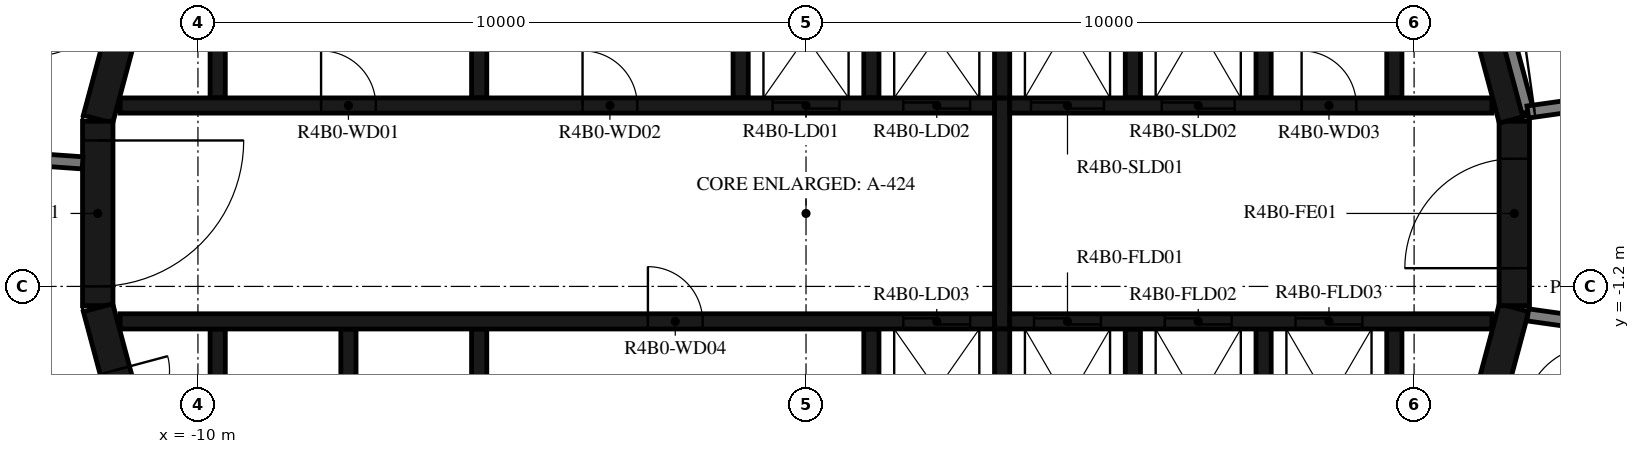
"""IFC4 building model, lengths in metres.
Left out: names, types, materials, properties, quantities, classifications, styles, units other than length and angle.
Written with IfcOpenShell. Run it as: python <this file> out.ifc"""

import sys

from ifc_helpers import new_model, si_unit, direction, frame, frame_2d, origin, place, context, subcontext, project, spatial, polyline, rectangle, outline, extrude, element, fill, save


model = new_model("IFC4")
c1 = context("Model", 3, precision=1e-05, world=origin(), true_north=direction((0.0, 1.0)))
c2 = subcontext(c1, "Body", "Model", "MODEL_VIEW")
j1 = project(units=[si_unit("LENGTHUNIT", "METRE"), si_unit("PLANEANGLEUNIT", "RADIAN")], contexts=[c1])
p1 = place(None, origin())
s1 = spatial("IfcSite", under=j1, at=p1, CompositionType="ELEMENT")
p2 = place(p1, origin())
s2 = spatial("IfcBuilding", under=s1, at=p2, CompositionType="ELEMENT")
p3 = place(p2, frame((0.0, 0.0, 165.7)))
s3 = spatial("IfcBuildingStorey", under=s2, at=p3, CompositionType="ELEMENT", Elevation=165.7)
p4 = place(p3, frame((10.858, -4.479, 0.0), z_axis=(0.0, 0.0, 1.0), x_axis=(0.258734743916, 0.965948410781, 0.0)))
e1 = element("IfcWall", 1, at=p4, inside=s3, PredefinedType="SHEAR", context=c2, shape_type="SweptSolid", body=[
    extrude(rectangle(XDim=3.033, YDim=0.5, at=frame_2d((1.516, 0.0))), origin(), (0.0, 0.0, 1.0), 3.12),
])
p5 = place(p3, frame((11.647, -1.516, 0.0), z_axis=(0.0, 0.0, 1.0), x_axis=(0.0, 1.0, 0.0)))
e2 = element("IfcWall", 2, at=p5, inside=s3, PredefinedType="SHEAR", context=c2, shape_type="SweptSolid", body=[
    extrude(rectangle(XDim=3.033, YDim=0.5, at=frame_2d((1.516, 0.0))), origin(), (0.0, 0.0, 1.0), 3.12),
])
p6 = place(p5, frame((0.616, 0.0, 0.0)))
e3 = element("IfcOpeningElement", 3, at=p6, cuts=e2, PredefinedType="OPENING", context=c2, shape_type="SweptSolid", body=[
    extrude(rectangle(XDim=1.8, YDim=2.1, at=frame_2d((0.9, 1.05))), frame((0.0, 0.26, 0.0), z_axis=(0.0, -1.0, 0.0), x_axis=(1.0, 0.0, 0.0)), (0.0, 0.0, 1.0), 0.52),
])
for number, where, z_axis, x_axis in (
    (4, (11.643, 1.55, 0.0), (0.0, 0.0, 1.0), (-0.259, 0.966, 0.0)),
    (5, (-10.858, 4.479, 0.0), (0.0, 0.0, 1.0), (-0.259, -0.966, 0.0)),
):
    element("IfcWall", number, at=place(p3, frame(where, z_axis=z_axis, x_axis=x_axis)), inside=s3, PredefinedType="SHEAR", context=c2, shape_type="SweptSolid", body=[
        extrude(rectangle(XDim=3.033, YDim=0.5, at=frame_2d((1.516, 0.0))), origin(), (0.0, 0.0, 1.0), 3.12),
    ])
p7 = place(p3, frame((-11.647, 1.516, 0.0), z_axis=(0.0, 0.0, 1.0), x_axis=(0.0, -1.0, 0.0)))
e6 = element("IfcWall", 6, at=p7, inside=s3, PredefinedType="SHEAR", context=c2, shape_type="SweptSolid", body=[
    extrude(rectangle(XDim=3.033, YDim=0.5, at=frame_2d((1.516, 0.0))), origin(), (0.0, 0.0, 1.0), 3.12),
])
p8 = place(p7, frame((0.316, 0.0, 0.0)))
e7 = element("IfcOpeningElement", 7, at=p8, cuts=e6, PredefinedType="OPENING", context=c2, shape_type="SweptSolid", body=[
    extrude(rectangle(XDim=2.4, YDim=2.1, at=frame_2d((1.2, 1.05))), frame((0.0, 0.26, 0.0), z_axis=(0.0, -1.0, 0.0), x_axis=(1.0, 0.0, 0.0)), (0.0, 0.0, 1.0), 0.52),
])
p9 = place(p3, frame((-11.643, -1.55, 0.0), z_axis=(0.0, 0.0, 1.0), x_axis=(0.258734743916, -0.965948410781, 0.0)))
e8 = element("IfcWall", 8, at=p9, inside=s3, PredefinedType="SHEAR", context=c2, shape_type="SweptSolid", body=[
    extrude(rectangle(XDim=3.033, YDim=0.5, at=frame_2d((1.516, 0.0))), origin(), (0.0, 0.0, 1.0), 3.12),
])
p10 = place(p9, frame((1.066, 0.0, 0.0)))
e9 = element("IfcOpeningElement", 9, at=p10, cuts=e8, PredefinedType="OPENING", context=c2, shape_type="SweptSolid", body=[
    extrude(rectangle(XDim=0.9, YDim=2.1, at=frame_2d((0.45, 1.05))), frame((0.0, 0.26, 0.0), z_axis=(0.0, -1.0, 0.0), x_axis=(1.0, 0.0, 0.0)), (0.0, 0.0, 1.0), 0.52),
])
p11 = place(p3, origin())
e10 = element("IfcWall", 10, at=p11, inside=s3, PredefinedType="SHEAR", context=c2, shape_type="SweptSolid", body=[
    extrude(outline(polyline([(-9.55, 4.8), (-5.5, 4.8), (-5.5, 1.9), (-5.25, 1.9), (-5.25, 4.8), (-1.2, 4.8), (-1.2, 1.9), (-0.95, 1.9), (-0.95, 4.8), (0.95, 4.8), (0.95, 1.9), (1.2, 1.9), (1.2, 4.8), (3.1, 4.8), (3.1, 1.9), (3.35, 1.9), (3.35, 4.8), (5.25, 4.8), (5.25, 1.9), (5.5, 1.9), (5.5, 4.8), (7.4, 4.8), (7.4, 1.9), (7.65, 1.9), (7.65, 4.8), (9.55, 4.8), (9.55, 1.9), (9.8, 1.9), (9.8, 4.8), (9.8, 5.05), (-9.8, 5.05), (-9.8, 4.8), (-9.8, 1.9), (-9.55, 1.9), (-9.55, 4.8)])), origin(), (0.0, 0.0, 1.0), 3.12),
])
p12 = place(p3, origin())
e11 = element("IfcWall", 11, at=p12, inside=s3, PredefinedType="SHEAR", context=c2, shape_type="SweptSolid", body=[
    extrude(outline(polyline([(9.8, -5.05), (9.8, -4.8), (9.8, -1.9), (9.55, -1.9), (9.55, -4.8), (7.65, -4.8), (7.65, -1.9), (7.4, -1.9), (7.4, -4.8), (5.5, -4.8), (5.5, -1.9), (5.25, -1.9), (5.25, -4.8), (3.35, -4.8), (3.35, -1.9), (3.1, -1.9), (3.1, -4.8), (1.2, -4.8), (1.2, -1.9), (0.95, -1.9), (0.95, -4.8), (-5.25, -4.8), (-5.25, -1.9), (-5.5, -1.9), (-5.5, -4.8), (-7.4, -4.8), (-7.4, -1.9), (-7.65, -1.9), (-7.65, -4.8), (-9.55, -4.8), (-9.55, -1.9), (-9.8, -1.9), (-9.8, -4.8), (-9.8, -5.05), (9.8, -5.05)])), origin(), (0.0, 0.0, 1.0), 3.12),
])
p13 = place(p3, frame((-11.28, 1.775, 0.0), z_axis=(0.0, 0.0, 1.0), x_axis=(1.0, 0.0, 0.0)))
e12 = element("IfcWall", 12, at=p13, inside=s3, PredefinedType="SHEAR", context=c2, shape_type="SweptSolid", body=[
    extrude(rectangle(XDim=14.38, YDim=0.25, at=frame_2d((7.19, 0.0))), origin(), (0.0, 0.0, 1.0), 3.12),
])
p14 = place(p13, frame((10.73, 0.0, 0.0)))
e13 = element("IfcOpeningElement", 13, at=p14, cuts=e12, PredefinedType="OPENING", context=c2, shape_type="SweptSolid", body=[
    extrude(rectangle(XDim=1.1, YDim=2.1, at=frame_2d((0.55, 1.05))), frame((0.0, 0.135, 0.0), z_axis=(0.0, -1.0, 0.0), x_axis=(1.0, 0.0, 0.0)), (0.0, 0.0, 1.0), 0.27),
])
p15 = place(p13, frame((12.88, 0.0, 0.0)))
e14 = element("IfcOpeningElement", 14, at=p15, cuts=e12, PredefinedType="OPENING", context=c2, shape_type="SweptSolid", body=[
    extrude(rectangle(XDim=1.1, YDim=2.1, at=frame_2d((0.55, 1.05))), frame((0.0, 0.135, 0.0), z_axis=(0.0, -1.0, 0.0), x_axis=(1.0, 0.0, 0.0)), (0.0, 0.0, 1.0), 0.27),
])
p16 = place(p13, frame((3.305, 0.0, 0.0)))
e15 = element("IfcOpeningElement", 15, at=p16, cuts=e12, PredefinedType="OPENING", context=c2, shape_type="SweptSolid", body=[
    extrude(rectangle(XDim=0.9, YDim=2.1, at=frame_2d((0.45, 1.05))), frame((0.0, 0.135, 0.0), z_axis=(0.0, -1.0, 0.0), x_axis=(1.0, 0.0, 0.0)), (0.0, 0.0, 1.0), 0.27),
])
p17 = place(p13, frame((7.605, 0.0, 0.0)))
e16 = element("IfcOpeningElement", 16, at=p17, cuts=e12, PredefinedType="OPENING", context=c2, shape_type="SweptSolid", body=[
    extrude(rectangle(XDim=0.9, YDim=2.1, at=frame_2d((0.45, 1.05))), frame((0.0, 0.135, 0.0), z_axis=(0.0, -1.0, 0.0), x_axis=(1.0, 0.0, 0.0)), (0.0, 0.0, 1.0), 0.27),
])
p18 = place(p3, frame((3.35, 1.775, 0.0), z_axis=(0.0, 0.0, 1.0), x_axis=(1.0, 0.0, 0.0)))
e17 = element("IfcWall", 17, at=p18, inside=s3, PredefinedType="SHEAR", context=c2, shape_type="SweptSolid", body=[
    extrude(rectangle(XDim=7.93, YDim=0.25, at=frame_2d((3.965, 0.0))), origin(), (0.0, 0.0, 1.0), 3.12),
])
p19 = place(p18, frame((0.35, 0.0, 0.0)))
e18 = element("IfcOpeningElement", 18, at=p19, cuts=e17, PredefinedType="OPENING", context=c2, shape_type="SweptSolid", body=[
    extrude(rectangle(XDim=1.2, YDim=2.4, at=frame_2d((0.6, 1.2))), frame((0.0, 0.135, 0.0), z_axis=(0.0, -1.0, 0.0), x_axis=(1.0, 0.0, 0.0)), (0.0, 0.0, 1.0), 0.27),
])
p20 = place(p18, frame((2.5, 0.0, 0.0)))
e19 = element("IfcOpeningElement", 19, at=p20, cuts=e17, PredefinedType="OPENING", context=c2, shape_type="SweptSolid", body=[
    extrude(rectangle(XDim=1.2, YDim=2.4, at=frame_2d((0.6, 1.2))), frame((0.0, 0.135, 0.0), z_axis=(0.0, -1.0, 0.0), x_axis=(1.0, 0.0, 0.0)), (0.0, 0.0, 1.0), 0.27),
])
p21 = place(p18, frame((4.8, 0.0, 0.0)))
e20 = element("IfcOpeningElement", 20, at=p21, cuts=e17, PredefinedType="OPENING", context=c2, shape_type="SweptSolid", body=[
    extrude(rectangle(XDim=0.9, YDim=2.1, at=frame_2d((0.45, 1.05))), frame((0.0, 0.135, 0.0), z_axis=(0.0, -1.0, 0.0), x_axis=(1.0, 0.0, 0.0)), (0.0, 0.0, 1.0), 0.27),
])
p22 = place(p3, frame((-11.28, -1.775, 0.0), z_axis=(0.0, 0.0, 1.0), x_axis=(1.0, 0.0, 0.0)))
e21 = element("IfcWall", 21, at=p22, inside=s3, PredefinedType="SHEAR", context=c2, shape_type="SweptSolid", body=[
    extrude(rectangle(XDim=14.38, YDim=0.25, at=frame_2d((7.19, 0.0))), origin(), (0.0, 0.0, 1.0), 3.12),
])
p23 = place(p22, frame((12.88, 0.0, 0.0)))
e22 = element("IfcOpeningElement", 22, at=p23, cuts=e21, PredefinedType="OPENING", context=c2, shape_type="SweptSolid", body=[
    extrude(rectangle(XDim=1.1, YDim=2.1, at=frame_2d((0.55, 1.05))), frame((0.0, 0.135, 0.0), z_axis=(0.0, -1.0, 0.0), x_axis=(1.0, 0.0, 0.0)), (0.0, 0.0, 1.0), 0.27),
])
p24 = place(p22, frame((8.68, 0.0, 0.0)))
e23 = element("IfcOpeningElement", 23, at=p24, cuts=e21, PredefinedType="OPENING", context=c2, shape_type="SweptSolid", body=[
    extrude(rectangle(XDim=0.9, YDim=2.1, at=frame_2d((0.45, 1.05))), frame((0.0, 0.135, 0.0), z_axis=(0.0, -1.0, 0.0), x_axis=(1.0, 0.0, 0.0)), (0.0, 0.0, 1.0), 0.27),
])
p25 = place(p3, frame((3.35, -1.775, 0.0), z_axis=(0.0, 0.0, 1.0), x_axis=(1.0, 0.0, 0.0)))
e24 = element("IfcWall", 24, at=p25, inside=s3, PredefinedType="SHEAR", context=c2, shape_type="SweptSolid", body=[
    extrude(rectangle(XDim=7.93, YDim=0.25, at=frame_2d((3.965, 0.0))), origin(), (0.0, 0.0, 1.0), 3.12),
])
p26 = place(p25, frame((0.4, 0.0, 0.0)))
e25 = element("IfcOpeningElement", 25, at=p26, cuts=e24, PredefinedType="OPENING", context=c2, shape_type="SweptSolid", body=[
    extrude(rectangle(XDim=1.1, YDim=2.4, at=frame_2d((0.55, 1.2))), frame((0.0, 0.135, 0.0), z_axis=(0.0, -1.0, 0.0), x_axis=(1.0, 0.0, 0.0)), (0.0, 0.0, 1.0), 0.27),
])
p27 = place(p25, frame((2.55, 0.0, 0.0)))
e26 = element("IfcOpeningElement", 26, at=p27, cuts=e24, PredefinedType="OPENING", context=c2, shape_type="SweptSolid", body=[
    extrude(rectangle(XDim=1.1, YDim=2.4, at=frame_2d((0.55, 1.2))), frame((0.0, 0.135, 0.0), z_axis=(0.0, -1.0, 0.0), x_axis=(1.0, 0.0, 0.0)), (0.0, 0.0, 1.0), 0.27),
])
p28 = place(p25, frame((4.7, 0.0, 0.0)))
e27 = element("IfcOpeningElement", 27, at=p28, cuts=e24, PredefinedType="OPENING", context=c2, shape_type="SweptSolid", body=[
    extrude(rectangle(XDim=1.1, YDim=2.4, at=frame_2d((0.55, 1.2))), frame((0.0, 0.135, 0.0), z_axis=(0.0, -1.0, 0.0), x_axis=(1.0, 0.0, 0.0)), (0.0, 0.0, 1.0), 0.27),
])
p29 = place(p3, frame((3.225, -1.9, 0.0), z_axis=(0.0, 0.0, 1.0), x_axis=(0.0, 1.0, 0.0)))
e28 = element("IfcWall", 28, at=p29, inside=s3, PredefinedType="SHEAR", context=c2, shape_type="SweptSolid", body=[
    extrude(rectangle(XDim=3.8, YDim=0.25, at=frame_2d((1.9, 0.0))), origin(), (0.0, 0.0, 1.0), 3.12),
])
p30 = place(p3, frame((11.87, 1.668, 0.0), z_axis=(0.0, 0.0, 1.0), x_axis=(-0.258836880648, 0.965921047093, 0.0)))
e29 = element("IfcWall", 29, at=p30, inside=s3, PredefinedType="STANDARD", context=c2, shape_type="SweptSolid", body=[
    extrude(rectangle(XDim=1.695, YDim=0.2, at=frame_2d((0.848, 0.0))), origin(), (0.0, 0.0, 1.0), 3.12),
])
p31 = place(p3, frame((11.87, 1.668, 0.0), z_axis=(0.0, 0.0, 1.0), x_axis=(0.990270910415, 0.139152879904, 0.0)))
e30 = element("IfcWall", 30, at=p31, inside=s3, PredefinedType="STANDARD", context=c2, shape_type="SweptSolid", body=[
    extrude(rectangle(XDim=1.688, YDim=0.2, at=frame_2d((0.844, 0.0))), origin(), (0.0, 0.0, 1.0), 3.12),
])
p32 = place(p31, frame((0.11, 0.0, 0.0)))
e31 = element("IfcOpeningElement", 31, at=p32, cuts=e30, PredefinedType="OPENING", context=c2, shape_type="SweptSolid", body=[
    extrude(rectangle(XDim=1.2, YDim=2.1, at=frame_2d((0.6, 1.05))), frame((0.0, 0.11, 0.0), z_axis=(0.0, -1.0, 0.0), x_axis=(1.0, 0.0, 0.0)), (0.0, 0.0, 1.0), 0.22),
])
p33 = place(p3, frame((13.542, 1.903, 0.0), z_axis=(0.0, 0.0, 1.0), x_axis=(-0.333808508206, 0.942640907159, 0.0)))
e32 = element("IfcWall", 32, at=p33, inside=s3, PredefinedType="STANDARD", context=c2, shape_type="SweptSolid", body=[
    extrude(rectangle(XDim=6.317, YDim=0.2, at=frame_2d((3.158, 0.0))), origin(), (0.0, 0.0, 1.0), 3.12),
])
p34 = place(p3, frame((-13.454, 0.941, 0.0), z_axis=(0.0, 0.0, 1.0), x_axis=(0.99755155062, -0.069934997354, 0.0)))
e33 = element("IfcWall", 33, at=p34, inside=s3, PredefinedType="STANDARD", context=c2, shape_type="SweptSolid", body=[
    extrude(rectangle(XDim=1.561, YDim=0.2, at=frame_2d((0.78, 0.0))), origin(), (0.0, 0.0, 1.0), 3.12),
])
p35 = place(p3, frame((13.282, -1.867, 0.0), z_axis=(0.0, 0.0, 1.0), x_axis=(-0.990265430288, 0.139191873241, 0.0)))
e34 = element("IfcWall", 34, at=p35, inside=s3, PredefinedType="STANDARD", context=c2, shape_type="SweptSolid", body=[
    extrude(rectangle(XDim=1.426, YDim=0.2, at=frame_2d((0.713, 0.0))), origin(), (0.0, 0.0, 1.0), 3.12),
])
p36 = place(p8, origin())
e35 = element("IfcDoor", 35, at=p36, inside=s3, OperationType="DOUBLE_DOOR_SINGLE_SWING", PredefinedType="DOOR", context=c2, shape_type="SweptSolid", body=[
    extrude(rectangle(XDim=2.4, YDim=2.1, at=frame_2d((1.2, 1.05))), frame((0.0, 0.025, 0.0), z_axis=(0.0, -1.0, 0.0), x_axis=(1.0, 0.0, 0.0)), (0.0, 0.0, 1.0), 0.05),
])
fill(e7, e35)
p37 = place(p6, origin())
e36 = element("IfcDoor", 36, at=p37, inside=s3, OperationType="DOUBLE_DOOR_SINGLE_SWING", PredefinedType="DOOR", context=c2, shape_type="SweptSolid", body=[
    extrude(rectangle(XDim=1.8, YDim=2.1, at=frame_2d((0.9, 1.05))), frame((0.0, 0.025, 0.0), z_axis=(0.0, -1.0, 0.0), x_axis=(1.0, 0.0, 0.0)), (0.0, 0.0, 1.0), 0.05),
])
fill(e3, e36)
p38 = place(p14, origin())
e37 = element("IfcDoor", 37, at=p38, inside=s3, OperationType="DOUBLE_DOOR_SLIDING", PredefinedType="DOOR", context=c2, shape_type="SweptSolid", body=[
    extrude(rectangle(XDim=1.1, YDim=2.1, at=frame_2d((0.55, 1.05))), frame((0.0, 0.025, 0.0), z_axis=(0.0, -1.0, 0.0), x_axis=(1.0, 0.0, 0.0)), (0.0, 0.0, 1.0), 0.05),
])
fill(e13, e37)
p39 = place(p15, origin())
e38 = element("IfcDoor", 38, at=p39, inside=s3, OperationType="DOUBLE_DOOR_SLIDING", PredefinedType="DOOR", context=c2, shape_type="SweptSolid", body=[
    extrude(rectangle(XDim=1.1, YDim=2.1, at=frame_2d((0.55, 1.05))), frame((0.0, 0.025, 0.0), z_axis=(0.0, -1.0, 0.0), x_axis=(1.0, 0.0, 0.0)), (0.0, 0.0, 1.0), 0.05),
])
fill(e14, e38)
p40 = place(p19, origin())
e39 = element("IfcDoor", 39, at=p40, inside=s3, OperationType="DOUBLE_DOOR_SLIDING", PredefinedType="DOOR", context=c2, shape_type="SweptSolid", body=[
    extrude(rectangle(XDim=1.2, YDim=2.4, at=frame_2d((0.6, 1.2))), frame((0.0, 0.025, 0.0), z_axis=(0.0, -1.0, 0.0), x_axis=(1.0, 0.0, 0.0)), (0.0, 0.0, 1.0), 0.05),
])
fill(e18, e39)
p41 = place(p20, origin())
e40 = element("IfcDoor", 40, at=p41, inside=s3, OperationType="DOUBLE_DOOR_SLIDING", PredefinedType="DOOR", context=c2, shape_type="SweptSolid", body=[
    extrude(rectangle(XDim=1.2, YDim=2.4, at=frame_2d((0.6, 1.2))), frame((0.0, 0.025, 0.0), z_axis=(0.0, -1.0, 0.0), x_axis=(1.0, 0.0, 0.0)), (0.0, 0.0, 1.0), 0.05),
])
fill(e19, e40)
p42 = place(p23, origin())
e41 = element("IfcDoor", 41, at=p42, inside=s3, OperationType="DOUBLE_DOOR_SLIDING", PredefinedType="DOOR", context=c2, shape_type="SweptSolid", body=[
    extrude(rectangle(XDim=1.1, YDim=2.1, at=frame_2d((0.55, 1.05))), frame((0.0, 0.025, 0.0), z_axis=(0.0, -1.0, 0.0), x_axis=(1.0, 0.0, 0.0)), (0.0, 0.0, 1.0), 0.05),
])
fill(e22, e41)
p43 = place(p26, origin())
e42 = element("IfcDoor", 42, at=p43, inside=s3, OperationType="DOUBLE_DOOR_SLIDING", PredefinedType="DOOR", context=c2, shape_type="SweptSolid", body=[
    extrude(rectangle(XDim=1.1, YDim=2.4, at=frame_2d((0.55, 1.2))), frame((0.0, 0.025, 0.0), z_axis=(0.0, -1.0, 0.0), x_axis=(1.0, 0.0, 0.0)), (0.0, 0.0, 1.0), 0.05),
])
fill(e25, e42)
p44 = place(p27, origin())
e43 = element("IfcDoor", 43, at=p44, inside=s3, OperationType="DOUBLE_DOOR_SLIDING", PredefinedType="DOOR", context=c2, shape_type="SweptSolid", body=[
    extrude(rectangle(XDim=1.1, YDim=2.4, at=frame_2d((0.55, 1.2))), frame((0.0, 0.025, 0.0), z_axis=(0.0, -1.0, 0.0), x_axis=(1.0, 0.0, 0.0)), (0.0, 0.0, 1.0), 0.05),
])
fill(e26, e43)
p45 = place(p28, origin())
e44 = element("IfcDoor", 44, at=p45, inside=s3, OperationType="DOUBLE_DOOR_SLIDING", PredefinedType="DOOR", context=c2, shape_type="SweptSolid", body=[
    extrude(rectangle(XDim=1.1, YDim=2.4, at=frame_2d((0.55, 1.2))), frame((0.0, 0.025, 0.0), z_axis=(0.0, -1.0, 0.0), x_axis=(1.0, 0.0, 0.0)), (0.0, 0.0, 1.0), 0.05),
])
fill(e27, e44)
p46 = place(p16, origin())
e45 = element("IfcDoor", 45, at=p46, inside=s3, OperationType="SINGLE_SWING_LEFT", PredefinedType="DOOR", context=c2, shape_type="SweptSolid", body=[
    extrude(rectangle(XDim=0.9, YDim=2.1, at=frame_2d((0.45, 1.05))), frame((0.0, 0.025, 0.0), z_axis=(0.0, -1.0, 0.0), x_axis=(1.0, 0.0, 0.0)), (0.0, 0.0, 1.0), 0.05),
])
fill(e15, e45)
p47 = place(p17, origin())
e46 = element("IfcDoor", 46, at=p47, inside=s3, OperationType="SINGLE_SWING_RIGHT", PredefinedType="DOOR", context=c2, shape_type="SweptSolid", body=[
    extrude(rectangle(XDim=0.9, YDim=2.1, at=frame_2d((0.45, 1.05))), frame((0.0, 0.025, 0.0), z_axis=(0.0, -1.0, 0.0), x_axis=(1.0, 0.0, 0.0)), (0.0, 0.0, 1.0), 0.05),
])
fill(e16, e46)
p48 = place(p21, origin())
e47 = element("IfcDoor", 47, at=p48, inside=s3, OperationType="SINGLE_SWING_LEFT", PredefinedType="DOOR", context=c2, shape_type="SweptSolid", body=[
    extrude(rectangle(XDim=0.9, YDim=2.1, at=frame_2d((0.45, 1.05))), frame((0.0, 0.025, 0.0), z_axis=(0.0, -1.0, 0.0), x_axis=(1.0, 0.0, 0.0)), (0.0, 0.0, 1.0), 0.05),
])
fill(e20, e47)
p49 = place(p24, origin())
e48 = element("IfcDoor", 48, at=p49, inside=s3, OperationType="SINGLE_SWING_RIGHT", PredefinedType="DOOR", context=c2, shape_type="SweptSolid", body=[
    extrude(rectangle(XDim=0.9, YDim=2.1, at=frame_2d((0.45, 1.05))), frame((0.0, 0.025, 0.0), z_axis=(0.0, -1.0, 0.0), x_axis=(1.0, 0.0, 0.0)), (0.0, 0.0, 1.0), 0.05),
])
fill(e23, e48)
p50 = place(p10, origin())
e49 = element("IfcDoor", 49, at=p50, inside=s3, OperationType="SINGLE_SWING_LEFT", PredefinedType="DOOR", context=c2, shape_type="SweptSolid", body=[
    extrude(rectangle(XDim=0.9, YDim=2.1, at=frame_2d((0.45, 1.05))), frame((0.0, 0.025, 0.0), z_axis=(0.0, -1.0, 0.0), x_axis=(1.0, 0.0, 0.0)), (0.0, 0.0, 1.0), 0.05),
])
fill(e9, e49)
p51 = place(p32, origin())
e50 = element("IfcDoor", 50, at=p51, inside=s3, OperationType="DOUBLE_DOOR_SINGLE_SWING", PredefinedType="DOOR", context=c2, shape_type="SweptSolid", body=[
    extrude(rectangle(XDim=1.2, YDim=2.1, at=frame_2d((0.6, 1.05))), frame((0.0, 0.025, 0.0), z_axis=(0.0, -1.0, 0.0), x_axis=(1.0, 0.0, 0.0)), (0.0, 0.0, 1.0), 0.05),
])
fill(e31, e50)
save(model, sys.argv[1])
